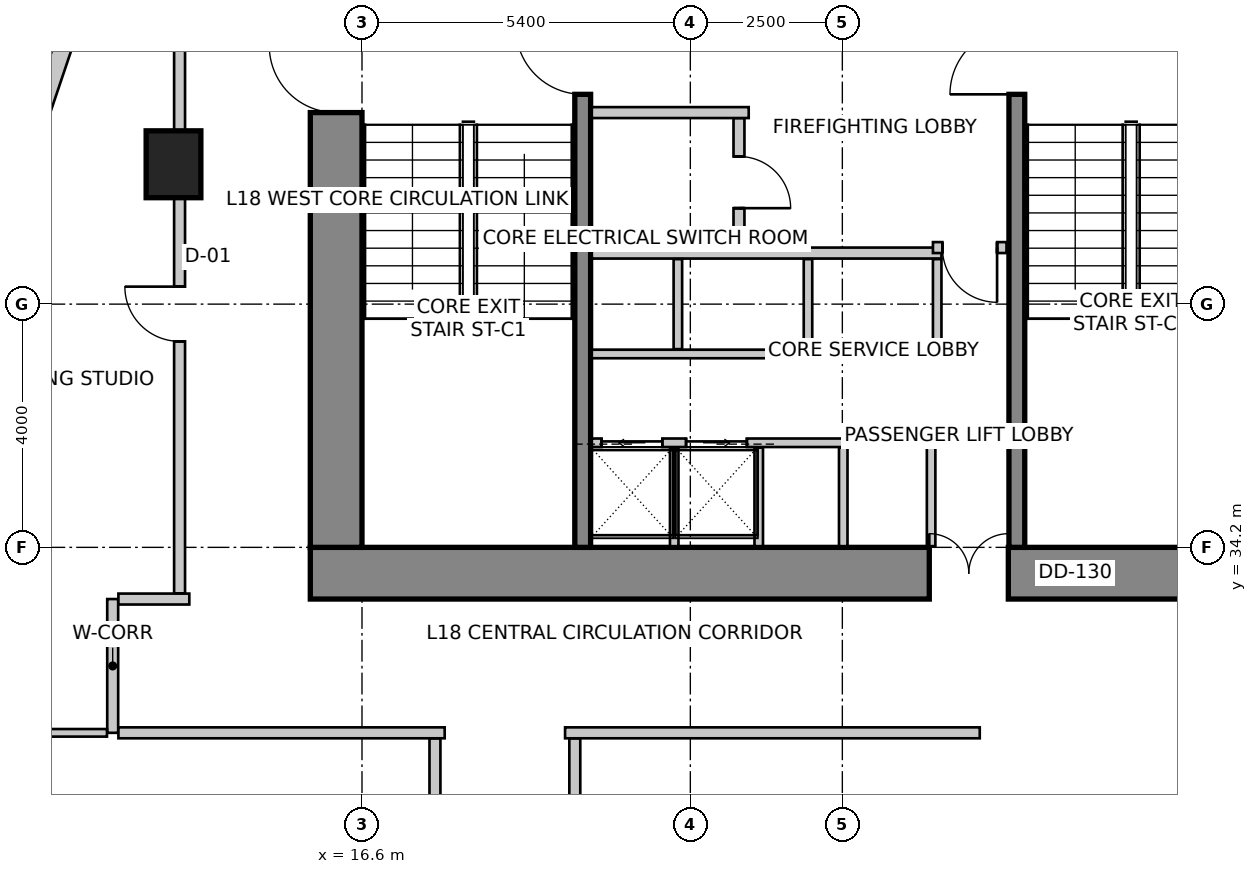
"""IFC4 building model, lengths in metres.
Left out: names, types, materials, properties, quantities, classifications, styles, units other than length and angle.
Written with IfcOpenShell. Run it as: python <this file> out.ifc"""

import sys

from ifc_helpers import new_model, si_unit, direction, frame, frame_2d, origin, origin_2d, place, context, subcontext, project, spatial, rectangle, extrude, source, transform, mapped, element, fill, save


model = new_model("IFC4")
c1 = context("Model", 3, precision=1e-05, world=origin(), true_north=direction((0.0, 1.0)))
c2 = subcontext(c1, "Body", "Model", "MODEL_VIEW")
j1 = project(units=[si_unit("LENGTHUNIT", "METRE"), si_unit("PLANEANGLEUNIT", "RADIAN")], contexts=[c1])
p1 = place(None, origin())
s1 = spatial("IfcSite", under=j1, at=p1, CompositionType="ELEMENT")
p2 = place(p1, origin())
s2 = spatial("IfcBuilding", under=s1, at=p2, CompositionType="ELEMENT")
p3 = place(p2, frame((0.0, 0.0, 75.0)))
s3 = spatial("IfcBuildingStorey", under=s2, at=p3, CompositionType="ELEMENT", Elevation=75.0)
p4 = place(p3, frame((15.75, 33.775, 0.0), z_axis=(0.0, 0.0, 1.0), x_axis=(1.0, 0.0, 0.0)))
e1 = element("IfcWall", 1, at=p4, inside=s3, PredefinedType="SHEAR", context=c2, shape_type="SweptSolid", body=[
    extrude(rectangle(XDim=16.1, YDim=0.85, at=frame_2d((8.05, 0.0))), origin(), (0.0, 0.0, 1.0), 4.0),
])
m1 = source(origin(), c2, "Body", "SweptSolid", [
    extrude(rectangle(XDim=1.3, YDim=2.15, at=frame_2d((0.65, 1.075))), frame((0.0, 0.435, 0.0), z_axis=(0.0, -1.0, 0.0), x_axis=(1.0, 0.0, 0.0)), (0.0, 0.0, 1.0), 0.87),
])
p5 = place(p4, frame((10.18, 0.0, 0.0)))
e2 = element("IfcOpeningElement", 2, at=p5, cuts=e1, PredefinedType="OPENING", context=c2, shape_type="MappedRepresentation", body=[
    mapped(m1, transform((0.0, 0.0, 0.0), scale=1.0)),
])
p6 = place(p3, frame((16.175, 34.2, 0.0), z_axis=(0.0, 0.0, 1.0), x_axis=(0.0, 1.0, 0.0)))
e3 = element("IfcWall", 3, at=p6, inside=s3, PredefinedType="SHEAR", context=c2, shape_type="SweptSolid", body=[
    extrude(rectangle(XDim=11.4, YDim=0.85, at=frame_2d((5.7, 0.0))), origin(), (0.0, 0.0, 1.0), 4.0),
])
m2 = source(origin(), c2, "Body", "SweptSolid", [
    extrude(rectangle(XDim=1.1, YDim=2.15, at=frame_2d((0.55, 1.075))), frame((0.0, 0.435, 0.0), z_axis=(0.0, -1.0, 0.0), x_axis=(1.0, 0.0, 0.0)), (0.0, 0.0, 1.0), 0.87),
])
p7 = place(p6, frame((7.15, 0.0, 0.0)))
e4 = element("IfcOpeningElement", 4, at=p7, cuts=e3, PredefinedType="OPENING", context=c2, shape_type="MappedRepresentation", body=[
    mapped(m2, transform((0.0, 0.0, 0.0), scale=1.0)),
])
p8 = place(p3, frame((20.23, 34.2, 0.0), z_axis=(0.0, 0.0, 1.0), x_axis=(0.0, 1.0, 0.0)))
e5 = element("IfcWall", 5, at=p8, inside=s3, PredefinedType="SHEAR", context=c2, shape_type="SweptSolid", body=[
    extrude(rectangle(XDim=9.06, YDim=0.26, at=frame_2d((4.53, 0.0))), origin(), (0.0, 0.0, 1.0), 4.0),
])
m3 = source(origin(), c2, "Body", "SweptSolid", [
    extrude(rectangle(XDim=1.1, YDim=2.15, at=frame_2d((0.55, 1.075))), frame((0.0, 0.14, 0.0), z_axis=(0.0, -1.0, 0.0), x_axis=(1.0, 0.0, 0.0)), (0.0, 0.0, 1.0), 0.28),
])
p9 = place(p8, frame((7.45, 0.0, 0.0)))
e6 = element("IfcOpeningElement", 6, at=p9, cuts=e5, PredefinedType="OPENING", context=c2, shape_type="MappedRepresentation", body=[
    mapped(m3, transform((0.0, 0.0, 0.0), scale=1.0)),
])
p10 = place(p3, frame((27.37, 34.2, 0.0), z_axis=(0.0, 0.0, 1.0), x_axis=(0.0, 1.0, 0.0)))
e7 = element("IfcWall", 7, at=p10, inside=s3, PredefinedType="SHEAR", context=c2, shape_type="SweptSolid", body=[
    extrude(rectangle(XDim=9.06, YDim=0.26, at=frame_2d((4.53, 0.0))), origin(), (0.0, 0.0, 1.0), 4.0),
])
p11 = place(p10, frame((7.45, 0.0, 0.0)))
e8 = element("IfcOpeningElement", 8, at=p11, cuts=e7, PredefinedType="OPENING", context=c2, shape_type="MappedRepresentation", body=[
    mapped(m3, transform((0.0, 0.0, 0.0), scale=1.0)),
])
m4 = source(origin(), c2, "Body", "SweptSolid", [
    extrude(rectangle(XDim=0.9, YDim=1.1, at=origin_2d()), origin(), (0.0, 0.0, 1.0), 4.0),
])
p12 = place(p3, frame((13.5, 40.5, 0.0), z_axis=(0.0, 0.0, 1.0), x_axis=(1.0, 0.0, 0.0)))
e9 = element("IfcColumn", 9, at=p12, inside=s3, PredefinedType="COLUMN", context=c2, shape_type="MappedRepresentation", body=[
    mapped(m4, transform((0.0, 0.0, 0.0), scale=1.0)),
])
p13 = place(p3, frame((13.269, 47.134, 0.0), z_axis=(0.0, 0.0, 1.0), x_axis=(-0.319920423265, -0.947444416722, 0.0)))
e10 = element("IfcWall", 10, at=p13, inside=s3, PredefinedType="SOLIDWALL", context=c2, shape_type="SweptSolid", body=[
    extrude(rectangle(XDim=16.135, YDim=0.3, at=frame_2d((8.067, 0.0))), origin(), (0.0, 0.0, 1.0), 3.75),
])
m5 = source(origin(), c2, "Body", "SweptSolid", [
    extrude(rectangle(XDim=2.8, YDim=2.4, at=frame_2d((1.4, 1.2))), frame((0.0, 0.16, 0.0), z_axis=(0.0, -1.0, 0.0), x_axis=(1.0, 0.0, 0.0)), (0.0, 0.0, 1.0), 0.32),
])
p14 = place(p13, frame((1.988, 0.0, 0.85)))
e11 = element("IfcOpeningElement", 11, at=p14, cuts=e10, PredefinedType="OPENING", context=c2, shape_type="MappedRepresentation", body=[
    mapped(m5, transform((0.0, 0.0, 0.0), scale=1.0)),
])
m6 = source(origin(), c2, "Body", "SweptSolid", [
    extrude(rectangle(XDim=2.4, YDim=2.2, at=frame_2d((1.2, 1.1))), frame((0.0, 0.16, 0.0), z_axis=(0.0, -1.0, 0.0), x_axis=(1.0, 0.0, 0.0)), (0.0, 0.0, 1.0), 0.32),
])
p15 = place(p13, frame((7.159, 0.0, 0.85)))
e12 = element("IfcOpeningElement", 12, at=p15, cuts=e10, PredefinedType="OPENING", context=c2, shape_type="MappedRepresentation", body=[
    mapped(m6, transform((0.0, 0.0, 0.0), scale=1.0)),
])
p16 = place(p13, frame((11.93, 0.0, 0.85)))
e13 = element("IfcOpeningElement", 13, at=p16, cuts=e10, PredefinedType="OPENING", context=c2, shape_type="MappedRepresentation", body=[
    mapped(m5, transform((0.0, 0.0, 0.0), scale=1.0)),
])
p17 = place(p3, frame((8.183, 31.833, 0.0), z_axis=(0.0, 0.0, 1.0), x_axis=(0.18216364648, -0.983268226834, 0.0)))
e14 = element("IfcWall", 14, at=p17, inside=s3, PredefinedType="SOLIDWALL", context=c2, shape_type="SweptSolid", body=[
    extrude(rectangle(XDim=26.678, YDim=0.3, at=frame_2d((13.339, 0.0))), origin(), (0.0, 0.0, 1.0), 3.75),
])
p18 = place(p17, frame((3.152, 0.0, 0.85)))
e15 = element("IfcOpeningElement", 15, at=p18, cuts=e14, PredefinedType="OPENING", context=c2, shape_type="MappedRepresentation", body=[
    mapped(m6, transform((0.0, 0.0, 0.0), scale=1.0)),
])
p19 = place(p17, frame((9.076, 0.0, 0.85)))
e16 = element("IfcOpeningElement", 16, at=p19, cuts=e14, PredefinedType="OPENING", context=c2, shape_type="MappedRepresentation", body=[
    mapped(m6, transform((0.0, 0.0, 0.0), scale=1.0)),
])
p20 = place(p17, frame((13.653, 0.0, 0.85)))
e17 = element("IfcOpeningElement", 17, at=p20, cuts=e14, PredefinedType="OPENING", context=c2, shape_type="MappedRepresentation", body=[
    mapped(m6, transform((0.0, 0.0, 0.0), scale=1.0)),
])
p21 = place(p17, frame((18.411, 0.0, 0.85)))
e18 = element("IfcOpeningElement", 18, at=p21, cuts=e14, PredefinedType="OPENING", context=c2, shape_type="MappedRepresentation", body=[
    mapped(m6, transform((0.0, 0.0, 0.0), scale=1.0)),
])
p22 = place(p17, frame((22.709, 0.0, 0.85)))
e19 = element("IfcOpeningElement", 19, at=p22, cuts=e14, PredefinedType="OPENING", context=c2, shape_type="MappedRepresentation", body=[
    mapped(m5, transform((0.0, 0.0, 0.0), scale=1.0)),
])
p23 = place(p3, frame((20.38, 35.92, 0.0), z_axis=(0.0, 0.0, 1.0), x_axis=(1.0, 0.0, 0.0)))
e20 = element("IfcWall", 20, at=p23, inside=s3, PredefinedType="SOLIDWALL", context=c2, shape_type="SweptSolid", body=[
    extrude(rectangle(XDim=5.65, YDim=0.14, at=frame_2d((2.825, 0.0))), origin(), (0.0, 0.0, 1.0), 3.75),
])
m7 = source(origin(), c2, "Body", "SweptSolid", [
    extrude(rectangle(XDim=1.0, YDim=2.15, at=frame_2d((0.5, 1.075))), frame((0.0, 0.08, 0.0), z_axis=(0.0, -1.0, 0.0), x_axis=(1.0, 0.0, 0.0)), (0.0, 0.0, 1.0), 0.16),
])
p24 = place(p23, frame((0.16, 0.0, 0.0)))
e21 = element("IfcOpeningElement", 21, at=p24, cuts=e20, PredefinedType="OPENING", context=c2, shape_type="MappedRepresentation", body=[
    mapped(m7, transform((0.0, 0.0, 0.0), scale=1.0)),
])
p25 = place(p23, frame((1.55, 0.0, 0.0)))
e22 = element("IfcOpeningElement", 22, at=p25, cuts=e20, PredefinedType="OPENING", context=c2, shape_type="MappedRepresentation", body=[
    mapped(m7, transform((0.0, 0.0, 0.0), scale=1.0)),
])
for number, where, z_axis, x_axis in (
    (23, (25.96, 34.22, 0.0), (0.0, 0.0, 1.0), (0.0, 1.0, 0.0)),
    (24, (21.735, 34.22, 0.0), (0.0, 0.0, 1.0), (0.0, 1.0, 0.0)),
    (25, (23.125, 34.22, 0.0), (0.0, 0.0, 1.0), (0.0, 1.0, 0.0)),
    (26, (24.515, 34.22, 0.0), (0.0, 0.0, 1.0), (0.0, 1.0, 0.0)),
):
    element("IfcWall", number, at=place(p3, frame(where, z_axis=z_axis, x_axis=x_axis)), inside=s3, PredefinedType="SOLIDWALL", context=c2, shape_type="SweptSolid", body=[
        extrude(rectangle(XDim=1.62, YDim=0.14, at=frame_2d((0.81, 0.0))), origin(), (0.0, 0.0, 1.0), 3.042),
    ])
p26 = place(p3, frame((20.38, 37.38, 0.0), z_axis=(0.0, 0.0, 1.0), x_axis=(1.0, 0.0, 0.0)))
e27 = element("IfcWall", 27, at=p26, inside=s3, PredefinedType="SOLIDWALL", context=c2, shape_type="SweptSolid", body=[
    extrude(rectangle(XDim=5.75, YDim=0.14, at=frame_2d((2.875, 0.0))), origin(), (0.0, 0.0, 1.0), 3.75),
])
p27 = place(p3, frame((20.38, 39.04, 0.0), z_axis=(0.0, 0.0, 1.0), x_axis=(1.0, 0.0, 0.0)))
e28 = element("IfcWall", 28, at=p27, inside=s3, PredefinedType="SOLIDWALL", context=c2, shape_type="SweptSolid", body=[
    extrude(rectangle(XDim=5.75, YDim=0.18, at=frame_2d((2.875, 0.0))), origin(), (0.0, 0.0, 1.0), 3.75),
])
for number, where, z_axis, x_axis in (
    (29, (26.06, 37.46, 0.0), (0.0, 0.0, 1.0), (0.0, 1.0, 0.0)),
    (30, (21.795, 37.46, 0.0), (0.0, 0.0, 1.0), (0.0, 1.0, 0.0)),
    (31, (23.935, 37.46, 0.0), (0.0, 0.0, 1.0), (0.0, 1.0, 0.0)),
):
    element("IfcWall", number, at=place(p3, frame(where, z_axis=z_axis, x_axis=x_axis)), inside=s3, PredefinedType="SOLIDWALL", context=c2, shape_type="SweptSolid", body=[
        extrude(rectangle(XDim=1.48, YDim=0.14, at=frame_2d((0.74, 0.0))), origin(), (0.0, 0.0, 1.0), 3.75),
    ])
p28 = place(p3, frame((22.96, 41.35, 0.0), z_axis=(0.0, 0.0, 1.0), x_axis=(-1.0, 0.0, 0.0)))
e32 = element("IfcWall", 32, at=p28, inside=s3, PredefinedType="PARTITIONING", context=c2, shape_type="SweptSolid", body=[
    extrude(rectangle(XDim=2.58, YDim=0.18, at=frame_2d((1.29, 0.0))), origin(), (0.0, 0.0, 1.0), 3.75),
])
p29 = place(p3, frame((22.8, 41.256, 0.0), z_axis=(0.0, 0.0, 1.0), x_axis=(0.0, -1.0, 0.0)))
e33 = element("IfcWall", 33, at=p29, inside=s3, PredefinedType="PARTITIONING", context=c2, shape_type="SweptSolid", body=[
    extrude(rectangle(XDim=2.106, YDim=0.18, at=frame_2d((1.053, 0.0))), origin(), (0.0, 0.0, 1.0), 3.75),
])
m8 = source(origin(), c2, "Body", "SweptSolid", [
    extrude(rectangle(XDim=0.85, YDim=2.15, at=frame_2d((0.425, 1.075))), frame((0.0, 0.1, 0.0), z_axis=(0.0, -1.0, 0.0), x_axis=(1.0, 0.0, 0.0)), (0.0, 0.0, 1.0), 0.2),
])
p30 = place(p29, frame((0.628, 0.0, 0.0)))
e34 = element("IfcOpeningElement", 34, at=p30, cuts=e33, PredefinedType="OPENING", context=c2, shape_type="MappedRepresentation", body=[
    mapped(m8, transform((0.0, 0.0, 0.0), scale=1.0)),
])
p31 = place(p3, frame((27.2, 39.13, 0.0), z_axis=(0.0, 0.0, 1.0), x_axis=(-1.0, 0.0, 0.0)))
e35 = element("IfcWall", 35, at=p31, inside=s3, PredefinedType="PARTITIONING", context=c2, shape_type="SweptSolid", body=[
    extrude(rectangle(XDim=1.21, YDim=0.18, at=frame_2d((0.605, 0.0))), origin(), (0.0, 0.0, 1.0), 3.75),
])
m9 = source(origin(), c2, "Body", "SweptSolid", [
    extrude(rectangle(XDim=0.9, YDim=2.15, at=frame_2d((0.45, 1.075))), frame((0.0, 0.1, 0.0), z_axis=(0.0, -1.0, 0.0), x_axis=(1.0, 0.0, 0.0)), (0.0, 0.0, 1.0), 0.2),
])
p32 = place(p31, frame((0.155, 0.0, 0.0)))
e36 = element("IfcOpeningElement", 36, at=p32, cuts=e35, PredefinedType="OPENING", context=c2, shape_type="MappedRepresentation", body=[
    mapped(m9, transform((0.0, 0.0, 0.0), scale=1.0)),
])
p33 = place(p3, frame((12.5, 31.15, 0.0), z_axis=(0.0, 0.0, 1.0), x_axis=(0.0, 1.0, 0.0)))
e37 = element("IfcWall", 37, at=p33, inside=s3, PredefinedType="PARTITIONING", context=c2, shape_type="SweptSolid", body=[
    extrude(rectangle(XDim=2.2, YDim=0.18, at=frame_2d((1.1, 0.0))), origin(), (0.0, 0.0, 1.0), 3.335),
])
p34 = place(p3, frame((12.594, 33.35, 0.0), z_axis=(0.0, 0.0, 1.0), x_axis=(1.0, 0.0, 0.0)))
e38 = element("IfcWall", 38, at=p34, inside=s3, PredefinedType="PARTITIONING", context=c2, shape_type="SweptSolid", body=[
    extrude(rectangle(XDim=1.166, YDim=0.18, at=frame_2d((0.583, 0.0))), origin(), (0.0, 0.0, 1.0), 3.75),
])
p35 = place(p3, frame((17.96, 31.15, 0.0), z_axis=(0.0, 0.0, 1.0), x_axis=(-1.0, 0.0, 0.0)))
e39 = element("IfcWall", 39, at=p35, inside=s3, PredefinedType="PARTITIONING", context=c2, shape_type="SweptSolid", body=[
    extrude(rectangle(XDim=5.366, YDim=0.18, at=frame_2d((2.683, 0.0))), origin(), (0.0, 0.0, 1.0), 3.335),
])
p36 = place(p3, frame((26.76, 31.15, 0.0), z_axis=(0.0, 0.0, 1.0), x_axis=(-1.0, 0.0, 0.0)))
e40 = element("IfcWall", 40, at=p36, inside=s3, PredefinedType="PARTITIONING", context=c2, shape_type="SweptSolid", body=[
    extrude(rectangle(XDim=6.82, YDim=0.18, at=frame_2d((3.41, 0.0))), origin(), (0.0, 0.0, 1.0), 3.335),
])
p37 = place(p3, frame((13.6, 33.444, 0.0), z_axis=(0.0, 0.0, 1.0), x_axis=(0.0, 1.0, 0.0)))
e41 = element("IfcWall", 41, at=p37, inside=s3, PredefinedType="PARTITIONING", context=c2, shape_type="SweptSolid", body=[
    extrude(rectangle(XDim=13.896, YDim=0.18, at=frame_2d((6.948, 0.0))), origin(), (0.0, 0.0, 1.0), 2.892),
])
p38 = place(p37, frame((4.144, 0.0, 0.0)))
e42 = element("IfcOpeningElement", 42, at=p38, cuts=e41, PredefinedType="OPENING", context=c2, shape_type="MappedRepresentation", body=[
    mapped(m9, transform((0.0, 0.0, 0.0), scale=1.0)),
])
p39 = place(p3, frame((12.406, 31.15, 0.0), z_axis=(0.0, 0.0, 1.0), x_axis=(-1.0, 0.0, 0.0)))
e43 = element("IfcWall", 43, at=p39, inside=s3, PredefinedType="PARTITIONING", context=c2, shape_type="SweptSolid", body=[
    extrude(rectangle(XDim=3.979, YDim=0.125, at=frame_2d((1.99, 0.0))), origin(), (0.0, 0.0, 1.0), 2.892),
])
p40 = place(p3, frame((17.8, 24.162, 0.0), z_axis=(0.0, 0.0, 1.0), x_axis=(0.0, 1.0, 0.0)))
e44 = element("IfcWall", 44, at=p40, inside=s3, PredefinedType="PARTITIONING", context=c2, shape_type="SweptSolid", body=[
    extrude(rectangle(XDim=6.894, YDim=0.18, at=frame_2d((3.447, 0.0))), origin(), (0.0, 0.0, 1.0), 3.125),
])
p41 = place(p40, frame((2.937, 0.0, 0.0)))
e45 = element("IfcOpeningElement", 45, at=p41, cuts=e44, PredefinedType="OPENING", context=c2, shape_type="MappedRepresentation", body=[
    mapped(m9, transform((0.0, 0.0, 0.0), scale=1.0)),
])
p42 = place(p3, frame((20.1, 31.056, 0.0), z_axis=(0.0, 0.0, 1.0), x_axis=(0.0, -1.0, 0.0)))
e46 = element("IfcWall", 46, at=p42, inside=s3, PredefinedType="PARTITIONING", context=c2, shape_type="SweptSolid", body=[
    extrude(rectangle(XDim=6.894, YDim=0.18, at=frame_2d((3.447, 0.0))), origin(), (0.0, 0.0, 1.0), 3.125),
])
p43 = place(p42, frame((2.937, 0.0, 0.0)))
e47 = element("IfcOpeningElement", 47, at=p43, cuts=e46, PredefinedType="OPENING", context=c2, shape_type="MappedRepresentation", body=[
    mapped(m9, transform((0.0, 0.0, 0.0), scale=1.0)),
])
m10 = source(origin(), c2, "Body", "SweptSolid", [
    extrude(rectangle(XDim=1.0, YDim=2.15, at=frame_2d((0.5, 1.075))), frame((0.0, 0.025, 0.0), z_axis=(0.0, -1.0, 0.0), x_axis=(1.0, 0.0, 0.0)), (0.0, 0.0, 1.0), 0.05),
])
p44 = place(p24, origin())
e48 = element("IfcDoor", 48, at=p44, inside=s3, OperationType="SLIDING_TO_LEFT", PredefinedType="DOOR", context=c2, shape_type="MappedRepresentation", body=[
    mapped(m10, transform((0.0, 0.0, 0.0), scale=1.0)),
])
fill(e21, e48)
p45 = place(p25, origin())
e49 = element("IfcDoor", 49, at=p45, inside=s3, OperationType="SLIDING_TO_RIGHT", PredefinedType="DOOR", context=c2, shape_type="MappedRepresentation", body=[
    mapped(m10, transform((0.0, 0.0, 0.0), scale=1.0)),
])
fill(e22, e49)
m11 = source(origin(), c2, "Body", "SweptSolid", [
    extrude(rectangle(XDim=1.1, YDim=2.15, at=frame_2d((0.55, 1.075))), frame((0.0, 0.025, 0.0), z_axis=(0.0, -1.0, 0.0), x_axis=(1.0, 0.0, 0.0)), (0.0, 0.0, 1.0), 0.05),
])
p46 = place(p9, origin())
e50 = element("IfcDoor", 50, at=p46, inside=s3, OperationType="SINGLE_SWING_RIGHT", PredefinedType="DOOR", context=c2, shape_type="MappedRepresentation", body=[
    mapped(m11, transform((0.0, 0.0, 0.0), scale=1.0)),
])
fill(e6, e50)
p47 = place(p11, origin())
e51 = element("IfcDoor", 51, at=p47, inside=s3, OperationType="SINGLE_SWING_LEFT", PredefinedType="DOOR", context=c2, shape_type="MappedRepresentation", body=[
    mapped(m11, transform((0.0, 0.0, 0.0), scale=1.0)),
])
fill(e8, e51)
p48 = place(p7, origin())
e52 = element("IfcDoor", 52, at=p48, inside=s3, OperationType="SINGLE_SWING_RIGHT", PredefinedType="DOOR", context=c2, shape_type="MappedRepresentation", body=[
    mapped(m11, transform((0.0, 0.0, 0.0), scale=1.0)),
])
fill(e4, e52)
m12 = source(origin(), c2, "Body", "SweptSolid", [
    extrude(rectangle(XDim=1.3, YDim=2.15, at=frame_2d((0.65, 1.075))), frame((0.0, 0.025, 0.0), z_axis=(0.0, -1.0, 0.0), x_axis=(1.0, 0.0, 0.0)), (0.0, 0.0, 1.0), 0.05),
])
p49 = place(p5, origin())
e53 = element("IfcDoor", 53, at=p49, inside=s3, OperationType="DOUBLE_DOOR_SINGLE_SWING", PredefinedType="DOOR", context=c2, shape_type="MappedRepresentation", body=[
    mapped(m12, transform((0.0, 0.0, 0.0), scale=1.0)),
])
fill(e2, e53)
m13 = source(origin(), c2, "Body", "SweptSolid", [
    extrude(rectangle(XDim=0.85, YDim=2.15, at=frame_2d((0.425, 1.075))), frame((0.0, 0.025, 0.0), z_axis=(0.0, -1.0, 0.0), x_axis=(1.0, 0.0, 0.0)), (0.0, 0.0, 1.0), 0.05),
])
p50 = place(p30, origin())
e54 = element("IfcDoor", 54, at=p50, inside=s3, OperationType="SINGLE_SWING_RIGHT", PredefinedType="DOOR", context=c2, shape_type="MappedRepresentation", body=[
    mapped(m13, transform((0.0, 0.0, 0.0), scale=1.0)),
])
fill(e34, e54)
m14 = source(origin(), c2, "Body", "SweptSolid", [
    extrude(rectangle(XDim=0.9, YDim=2.15, at=frame_2d((0.45, 1.075))), frame((0.0, 0.025, 0.0), z_axis=(0.0, -1.0, 0.0), x_axis=(1.0, 0.0, 0.0)), (0.0, 0.0, 1.0), 0.05),
])
p51 = place(p32, origin())
e55 = element("IfcDoor", 55, at=p51, inside=s3, OperationType="SINGLE_SWING_LEFT", PredefinedType="DOOR", context=c2, shape_type="MappedRepresentation", body=[
    mapped(m14, transform((0.0, 0.0, 0.0), scale=1.0)),
])
fill(e36, e55)
m15 = source(origin(), c2, "Body", "SweptSolid", [
    extrude(rectangle(XDim=0.9, YDim=2.15, at=frame_2d((0.45, 1.075))), frame((0.0, 0.025, 0.0), z_axis=(0.0, -1.0, 0.0), x_axis=(1.0, 0.0, 0.0)), (0.0, 0.0, 1.0), 0.05),
])
p52 = place(p38, origin())
e56 = element("IfcDoor", 56, at=p52, inside=s3, OperationType="SINGLE_SWING_RIGHT", PredefinedType="DOOR", context=c2, shape_type="MappedRepresentation", body=[
    mapped(m15, transform((0.0, 0.0, 0.0), scale=1.0)),
])
fill(e42, e56)
save(model, sys.argv[1])
